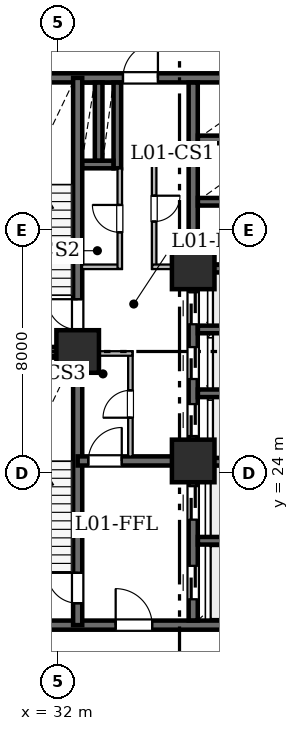
"""IFC4 building model, lengths in metres.
Left out: names, types, materials, properties, quantities, classifications, styles, units other than length and angle.
Written with IfcOpenShell. Run it as: python <this file> out.ifc"""

import sys

from ifc_helpers import new_model, si_unit, direction, frame, frame_2d, origin, origin_2d, place, context, subcontext, project, spatial, rectangle, hollow_rectangle, extrude, element, fill, save


model = new_model("IFC4")
c1 = context("Model", 3, precision=1e-05, world=origin(), true_north=direction((0.0, 1.0)))
c2 = subcontext(c1, "Body", "Model", "MODEL_VIEW")
j1 = project(units=[si_unit("LENGTHUNIT", "METRE"), si_unit("PLANEANGLEUNIT", "RADIAN")], contexts=[c1])
p1 = place(None, origin())
s1 = spatial("IfcSite", under=j1, at=p1, CompositionType="ELEMENT")
p2 = place(p1, origin())
s2 = spatial("IfcBuilding", under=s1, at=p2, CompositionType="ELEMENT")
p3 = place(p2, frame((0.0, 0.0, 7.2)))
s3 = spatial("IfcBuildingStorey", under=s2, at=p3, CompositionType="ELEMENT", Elevation=7.2)
for number, where, z_axis, x_axis in (
    (1, (32.65, 28.0, 0.0), (0.0, 0.0, 1.0), (1.0, 0.0, 0.0)),
    (2, (36.45, 24.4, 0.0), (0.0, 0.0, 1.0), (1.0, 0.0, 0.0)),
    (3, (36.45, 30.75, 0.0), (0.0, 0.0, 1.0), (1.0, 0.0, 0.0)),
):
    element("IfcColumn", number, at=place(p3, frame(where, z_axis=z_axis, x_axis=x_axis)), inside=s3, PredefinedType="COLUMN", context=c2, shape_type="SweptSolid", body=[
        extrude(hollow_rectangle(XDim=1.4, YDim=1.4, WallThickness=0.07, at=origin_2d()), origin(), (0.0, 0.0, 1.0), 4.8),
    ])
p4 = place(p3, frame((29.0, 19.0, 0.0), z_axis=(0.0, 0.0, 1.0), x_axis=(1.0, 0.0, 0.0)))
e4 = element("IfcWall", 4, at=p4, inside=s3, PredefinedType="SHEAR", context=c2, shape_type="SweptSolid", body=[
    extrude(rectangle(XDim=10.4, YDim=0.3, at=frame_2d((5.2, 0.0))), origin(), (0.0, 0.0, 1.0), 4.48),
])
p5 = place(p4, frame((4.9, 0.0, 0.0)))
e5 = element("IfcOpeningElement", 5, at=p5, cuts=e4, PredefinedType="OPENING", context=c2, shape_type="SweptSolid", body=[
    extrude(rectangle(XDim=1.2, YDim=2.15, at=frame_2d((0.6, 1.075))), frame((0.0, 0.16, 0.0), z_axis=(0.0, -1.0, 0.0), x_axis=(1.0, 0.0, 0.0)), (0.0, 0.0, 1.0), 0.32),
])
p6 = place(p3, frame((29.0, 37.0, 0.0), z_axis=(0.0, 0.0, 1.0), x_axis=(1.0, 0.0, 0.0)))
e6 = element("IfcWall", 6, at=p6, inside=s3, PredefinedType="SHEAR", context=c2, shape_type="SweptSolid", body=[
    extrude(rectangle(XDim=10.4, YDim=0.3, at=frame_2d((5.2, 0.0))), origin(), (0.0, 0.0, 1.0), 4.48),
])
p7 = place(p6, frame((5.14, 0.0, 0.0)))
e7 = element("IfcOpeningElement", 7, at=p7, cuts=e6, PredefinedType="OPENING", context=c2, shape_type="SweptSolid", body=[
    extrude(rectangle(XDim=1.15, YDim=2.2, at=frame_2d((0.575, 1.1))), frame((0.0, 0.16, 0.0), z_axis=(0.0, -1.0, 0.0), x_axis=(1.0, 0.0, 0.0)), (0.0, 0.0, 1.0), 0.32),
])
p8 = place(p3, frame((32.65, 19.0, 0.0), z_axis=(0.0, 0.0, 1.0), x_axis=(0.0, 1.0, 0.0)))
e8 = element("IfcWall", 8, at=p8, inside=s3, PredefinedType="SHEAR", context=c2, shape_type="SweptSolid", body=[
    extrude(rectangle(XDim=9.0, YDim=0.3, at=frame_2d((4.5, 0.0))), origin(), (0.0, 0.0, 1.0), 4.48),
])
p9 = place(p8, frame((0.72, 0.0, 0.0)))
e9 = element("IfcOpeningElement", 9, at=p9, cuts=e8, PredefinedType="OPENING", context=c2, shape_type="SweptSolid", body=[
    extrude(rectangle(XDim=1.0, YDim=2.15, at=frame_2d((0.5, 1.075))), frame((0.0, 0.16, 0.0), z_axis=(0.0, -1.0, 0.0), x_axis=(1.0, 0.0, 0.0)), (0.0, 0.0, 1.0), 0.32),
])
p10 = place(p3, frame((32.65, 28.0, 0.0), z_axis=(0.0, 0.0, 1.0), x_axis=(0.0, 1.0, 0.0)))
e10 = element("IfcWall", 10, at=p10, inside=s3, PredefinedType="SHEAR", context=c2, shape_type="SweptSolid", body=[
    extrude(rectangle(XDim=9.0, YDim=0.3, at=frame_2d((4.5, 0.0))), origin(), (0.0, 0.0, 1.0), 4.48),
])
p11 = place(p10, frame((0.72, 0.0, 0.0)))
e11 = element("IfcOpeningElement", 11, at=p11, cuts=e10, PredefinedType="OPENING", context=c2, shape_type="SweptSolid", body=[
    extrude(rectangle(XDim=1.0, YDim=2.15, at=frame_2d((0.5, 1.075))), frame((0.0, 0.16, 0.0), z_axis=(0.0, -1.0, 0.0), x_axis=(1.0, 0.0, 0.0)), (0.0, 0.0, 1.0), 0.32),
])
p12 = place(p3, frame((29.0, 28.0, 0.0), z_axis=(0.0, 0.0, 1.0), x_axis=(1.0, 0.0, 0.0)))
e12 = element("IfcWall", 12, at=p12, inside=s3, PredefinedType="SHEAR", context=c2, shape_type="SweptSolid", body=[
    extrude(rectangle(XDim=3.65, YDim=0.3, at=frame_2d((1.825, 0.0))), origin(), (0.0, 0.0, 1.0), 4.48),
])
p13 = place(p3, frame((32.65, 24.4, 0.0), z_axis=(0.0, 0.0, 1.0), x_axis=(1.0, 0.0, 0.0)))
e13 = element("IfcWall", 13, at=p13, inside=s3, PredefinedType="SHEAR", context=c2, shape_type="SweptSolid", body=[
    extrude(rectangle(XDim=3.8, YDim=0.3, at=frame_2d((1.9, 0.0))), origin(), (0.0, 0.0, 1.0), 4.48),
])
p14 = place(p13, frame((0.35, 0.0, 0.0)))
e14 = element("IfcOpeningElement", 14, at=p14, cuts=e13, PredefinedType="OPENING", context=c2, shape_type="SweptSolid", body=[
    extrude(rectangle(XDim=1.1, YDim=2.15, at=frame_2d((0.55, 1.075))), frame((0.0, 0.16, 0.0), z_axis=(0.0, -1.0, 0.0), x_axis=(1.0, 0.0, 0.0)), (0.0, 0.0, 1.0), 0.32),
])
p15 = place(p3, frame((36.45, 19.154, 0.0), z_axis=(0.0, 0.0, 1.0), x_axis=(0.0, 1.0, 0.0)))
e15 = element("IfcWall", 15, at=p15, inside=s3, PredefinedType="SHEAR", context=c2, shape_type="SweptSolid", body=[
    extrude(rectangle(XDim=4.546, YDim=0.3, at=frame_2d((2.273, 0.0))), origin(), (0.0, 0.0, 1.0), 4.48),
])
p16 = place(p15, frame((0.696, 0.0, 0.0)))
e16 = element("IfcOpeningElement", 16, at=p16, cuts=e15, PredefinedType="OPENING", context=c2, shape_type="SweptSolid", body=[
    extrude(rectangle(XDim=1.1, YDim=2.15, at=frame_2d((0.55, 1.075))), frame((0.0, 0.16, 0.0), z_axis=(0.0, -1.0, 0.0), x_axis=(1.0, 0.0, 0.0)), (0.0, 0.0, 1.0), 0.32),
])
p17 = place(p15, frame((3.316, 0.0, 0.0)))
e17 = element("IfcOpeningElement", 17, at=p17, cuts=e15, PredefinedType="OPENING", context=c2, shape_type="SweptSolid", body=[
    extrude(rectangle(XDim=1.1, YDim=2.15, at=frame_2d((0.55, 1.075))), frame((0.0, 0.16, 0.0), z_axis=(0.0, -1.0, 0.0), x_axis=(1.0, 0.0, 0.0)), (0.0, 0.0, 1.0), 0.32),
])
p18 = place(p3, frame((36.45, 25.1, 0.0), z_axis=(0.0, 0.0, 1.0), x_axis=(0.0, 1.0, 0.0)))
e18 = element("IfcWall", 18, at=p18, inside=s3, PredefinedType="SHEAR", context=c2, shape_type="SweptSolid", body=[
    extrude(rectangle(XDim=4.95, YDim=0.3, at=frame_2d((2.475, 0.0))), origin(), (0.0, 0.0, 1.0), 4.48),
])
p19 = place(p18, frame((0.12, 0.0, 0.0)))
e19 = element("IfcOpeningElement", 19, at=p19, cuts=e18, PredefinedType="OPENING", context=c2, shape_type="SweptSolid", body=[
    extrude(rectangle(XDim=1.05, YDim=2.15, at=frame_2d((0.525, 1.075))), frame((0.0, 0.16, 0.0), z_axis=(0.0, -1.0, 0.0), x_axis=(1.0, 0.0, 0.0)), (0.0, 0.0, 1.0), 0.32),
])
p20 = place(p18, frame((1.995, 0.0, 0.0)))
e20 = element("IfcOpeningElement", 20, at=p20, cuts=e18, PredefinedType="OPENING", context=c2, shape_type="SweptSolid", body=[
    extrude(rectangle(XDim=1.05, YDim=2.15, at=frame_2d((0.525, 1.075))), frame((0.0, 0.16, 0.0), z_axis=(0.0, -1.0, 0.0), x_axis=(1.0, 0.0, 0.0)), (0.0, 0.0, 1.0), 0.32),
])
p21 = place(p18, frame((3.795, 0.0, 0.0)))
e21 = element("IfcOpeningElement", 21, at=p21, cuts=e18, PredefinedType="OPENING", context=c2, shape_type="SweptSolid", body=[
    extrude(rectangle(XDim=1.05, YDim=2.15, at=frame_2d((0.525, 1.075))), frame((0.0, 0.16, 0.0), z_axis=(0.0, -1.0, 0.0), x_axis=(1.0, 0.0, 0.0)), (0.0, 0.0, 1.0), 0.32),
])
p22 = place(p3, frame((36.45, 31.45, 0.0), z_axis=(0.0, 0.0, 1.0), x_axis=(0.0, 1.0, 0.0)))
e22 = element("IfcWall", 22, at=p22, inside=s3, PredefinedType="SHEAR", context=c2, shape_type="SweptSolid", body=[
    extrude(rectangle(XDim=5.396, YDim=0.3, at=frame_2d((2.698, 0.0))), origin(), (0.0, 0.0, 1.0), 4.48),
])
for number, where, z_axis, x_axis in (
    (23, (36.604, 21.775, 0.0), (0.0, 0.0, 1.0), (1.0, 0.0, 0.0)),
    (24, (36.604, 24.375, 0.0), (0.0, 0.0, 1.0), (1.0, 0.0, 0.0)),
    (25, (36.604, 26.625, 0.0), (0.0, 0.0, 1.0), (1.0, 0.0, 0.0)),
    (26, (36.604, 28.725, 0.0), (0.0, 0.0, 1.0), (1.0, 0.0, 0.0)),
    (27, (36.604, 30.725, 0.0), (0.0, 0.0, 1.0), (1.0, 0.0, 0.0)),
    (28, (36.604, 32.925, 0.0), (0.0, 0.0, 1.0), (1.0, 0.0, 0.0)),
    (29, (36.604, 34.975, 0.0), (0.0, 0.0, 1.0), (1.0, 0.0, 0.0)),
):
    element("IfcWall", number, at=place(p3, frame(where, z_axis=z_axis, x_axis=x_axis)), inside=s3, PredefinedType="SHEAR", context=c2, shape_type="SweptSolid", body=[
        extrude(rectangle(XDim=2.642, YDim=0.25, at=frame_2d((1.321, 0.0))), origin(), (0.0, 0.0, 1.0), 4.48),
    ])
p23 = place(p3, frame((33.955, 34.025, 0.0), z_axis=(0.0, 0.0, 1.0), x_axis=(0.0, 1.0, 0.0)))
e30 = element("IfcWall", 30, at=p23, inside=s3, PredefinedType="SHEAR", context=c2, shape_type="SweptSolid", body=[
    extrude(rectangle(XDim=2.821, YDim=0.25, at=frame_2d((1.411, 0.0))), origin(), (0.0, 0.0, 1.0), 4.48),
])
p24 = place(p3, frame((32.804, 34.15, 0.0), z_axis=(0.0, 0.0, 1.0), x_axis=(1.0, 0.0, 0.0)))
e31 = element("IfcWall", 31, at=p24, inside=s3, PredefinedType="SHEAR", context=c2, shape_type="SweptSolid", body=[
    extrude(rectangle(XDim=1.022, YDim=0.25, at=frame_2d((0.511, 0.0))), origin(), (0.0, 0.0, 1.0), 4.48),
])
p25 = place(p3, frame((33.34, 34.279, 0.0), z_axis=(0.0, 0.0, 1.0), x_axis=(0.0, 1.0, 0.0)))
e32 = element("IfcWall", 32, at=p25, inside=s3, PredefinedType="SHEAR", context=c2, shape_type="SweptSolid", body=[
    extrude(rectangle(XDim=2.567, YDim=0.25, at=frame_2d((1.283, 0.0))), origin(), (0.0, 0.0, 1.0), 4.48),
])
p26 = place(p3, frame((36.306, 34.615, 0.0), z_axis=(0.0, 0.0, 1.0), x_axis=(-1.0, 0.0, 0.0)))
e33 = element("IfcWall", 33, at=p26, inside=s3, PredefinedType="STANDARD", context=c2, shape_type="SweptSolid", body=[
    extrude(rectangle(XDim=1.206, YDim=0.15, at=frame_2d((0.603, 0.0))), origin(), (0.0, 0.0, 1.0), 4.48),
])
p27 = place(p3, frame((35.165, 34.678, 0.0), z_axis=(0.0, 0.0, 1.0), x_axis=(0.0, -1.0, 0.0)))
e34 = element("IfcWall", 34, at=p27, inside=s3, PredefinedType="STANDARD", context=c2, shape_type="SweptSolid", body=[
    extrude(rectangle(XDim=3.958, YDim=0.15, at=frame_2d((1.979, 0.0))), origin(), (0.0, 0.0, 1.0), 4.48),
])
p28 = place(p27, frame((1.554, 0.0, 0.0)))
e35 = element("IfcOpeningElement", 35, at=p28, cuts=e34, PredefinedType="OPENING", context=c2, shape_type="SweptSolid", body=[
    extrude(rectangle(XDim=0.85, YDim=2.1, at=frame_2d((0.425, 1.05))), frame((0.0, 0.085, 0.0), z_axis=(0.0, -1.0, 0.0), x_axis=(1.0, 0.0, 0.0)), (0.0, 0.0, 1.0), 0.17),
])
p29 = place(p3, frame((35.102, 30.785, 0.0), z_axis=(0.0, 0.0, 1.0), x_axis=(1.0, 0.0, 0.0)))
e36 = element("IfcWall", 36, at=p29, inside=s3, PredefinedType="STANDARD", context=c2, shape_type="SweptSolid", body=[
    extrude(rectangle(XDim=1.198, YDim=0.15, at=frame_2d((0.599, 0.0))), origin(), (0.0, 0.0, 1.0), 4.48),
])
p30 = place(p3, frame((32.794, 30.785, 0.0), z_axis=(0.0, 0.0, 1.0), x_axis=(1.0, 0.0, 0.0)))
e37 = element("IfcWall", 37, at=p30, inside=s3, PredefinedType="STANDARD", context=c2, shape_type="SweptSolid", body=[
    extrude(rectangle(XDim=1.306, YDim=0.15, at=frame_2d((0.653, 0.0))), origin(), (0.0, 0.0, 1.0), 3.937),
])
p31 = place(p3, frame((34.035, 30.72, 0.0), z_axis=(0.0, 0.0, 1.0), x_axis=(0.0, 1.0, 0.0)))
e38 = element("IfcWall", 38, at=p31, inside=s3, PredefinedType="STANDARD", context=c2, shape_type="SweptSolid", body=[
    extrude(rectangle(XDim=3.3, YDim=0.15, at=frame_2d((1.65, 0.0))), origin(), (0.0, 0.0, 1.0), 4.48),
])
p32 = place(p31, frame((1.2, 0.0, 0.0)))
e39 = element("IfcOpeningElement", 39, at=p32, cuts=e38, PredefinedType="OPENING", context=c2, shape_type="SweptSolid", body=[
    extrude(rectangle(XDim=0.9, YDim=2.1, at=frame_2d((0.45, 1.05))), frame((0.0, 0.085, 0.0), z_axis=(0.0, -1.0, 0.0), x_axis=(1.0, 0.0, 0.0)), (0.0, 0.0, 1.0), 0.17),
])
p33 = place(p3, frame((34.385, 24.544, 0.0), z_axis=(0.0, 0.0, 1.0), x_axis=(0.0, 1.0, 0.0)))
e40 = element("IfcWall", 40, at=p33, inside=s3, PredefinedType="STANDARD", context=c2, shape_type="SweptSolid", body=[
    extrude(rectangle(XDim=3.456, YDim=0.15, at=frame_2d((1.728, 0.0))), origin(), (0.0, 0.0, 1.0), 4.48),
])
p34 = place(p33, frame((1.278, 0.0, 0.0)))
e41 = element("IfcOpeningElement", 41, at=p34, cuts=e40, PredefinedType="OPENING", context=c2, shape_type="SweptSolid", body=[
    extrude(rectangle(XDim=0.9, YDim=2.1, at=frame_2d((0.45, 1.05))), frame((0.0, 0.085, 0.0), z_axis=(0.0, -1.0, 0.0), x_axis=(1.0, 0.0, 0.0)), (0.0, 0.0, 1.0), 0.17),
])
p35 = place(p3, frame((34.45, 27.935, 0.0), z_axis=(0.0, 0.0, 1.0), x_axis=(-1.0, 0.0, 0.0)))
e42 = element("IfcWall", 42, at=p35, inside=s3, PredefinedType="STANDARD", context=c2, shape_type="SweptSolid", body=[
    extrude(rectangle(XDim=1.656, YDim=0.15, at=frame_2d((0.828, 0.0))), origin(), (0.0, 0.0, 1.0), 3.937),
])
p36 = place(p9, origin())
e43 = element("IfcDoor", 43, at=p36, inside=s3, OperationType="SINGLE_SWING_RIGHT", PredefinedType="DOOR", context=c2, shape_type="SweptSolid", body=[
    extrude(rectangle(XDim=1.0, YDim=2.15, at=frame_2d((0.5, 1.075))), frame((0.0, 0.025, 0.0), z_axis=(0.0, -1.0, 0.0), x_axis=(1.0, 0.0, 0.0)), (0.0, 0.0, 1.0), 0.05),
])
fill(e9, e43)
p37 = place(p11, origin())
e44 = element("IfcDoor", 44, at=p37, inside=s3, OperationType="SINGLE_SWING_RIGHT", PredefinedType="DOOR", context=c2, shape_type="SweptSolid", body=[
    extrude(rectangle(XDim=1.0, YDim=2.15, at=frame_2d((0.5, 1.075))), frame((0.0, 0.025, 0.0), z_axis=(0.0, -1.0, 0.0), x_axis=(1.0, 0.0, 0.0)), (0.0, 0.0, 1.0), 0.05),
])
fill(e11, e44)
p38 = place(p14, origin())
e45 = element("IfcDoor", 45, at=p38, inside=s3, OperationType="SINGLE_SWING_RIGHT", PredefinedType="DOOR", context=c2, shape_type="SweptSolid", body=[
    extrude(rectangle(XDim=1.1, YDim=2.15, at=frame_2d((0.55, 1.075))), frame((0.0, 0.025, 0.0), z_axis=(0.0, -1.0, 0.0), x_axis=(1.0, 0.0, 0.0)), (0.0, 0.0, 1.0), 0.05),
])
fill(e14, e45)
p39 = place(p5, origin())
e46 = element("IfcDoor", 46, at=p39, inside=s3, OperationType="SINGLE_SWING_LEFT", PredefinedType="DOOR", context=c2, shape_type="SweptSolid", body=[
    extrude(rectangle(XDim=1.2, YDim=2.15, at=frame_2d((0.6, 1.075))), frame((0.0, 0.025, 0.0), z_axis=(0.0, -1.0, 0.0), x_axis=(1.0, 0.0, 0.0)), (0.0, 0.0, 1.0), 0.05),
])
fill(e5, e46)
p40 = place(p7, origin())
e47 = element("IfcDoor", 47, at=p40, inside=s3, OperationType="SINGLE_SWING_RIGHT", PredefinedType="DOOR", context=c2, shape_type="SweptSolid", body=[
    extrude(rectangle(XDim=1.15, YDim=2.2, at=frame_2d((0.575, 1.1))), frame((0.0, 0.025, 0.0), z_axis=(0.0, -1.0, 0.0), x_axis=(1.0, 0.0, 0.0)), (0.0, 0.0, 1.0), 0.05),
])
fill(e7, e47)
p41 = place(p16, origin())
e48 = element("IfcDoor", 48, at=p41, inside=s3, OperationType="SLIDING_TO_LEFT", PredefinedType="DOOR", context=c2, shape_type="SweptSolid", body=[
    extrude(rectangle(XDim=1.1, YDim=2.15, at=frame_2d((0.55, 1.075))), frame((0.0, 0.025, 0.0), z_axis=(0.0, -1.0, 0.0), x_axis=(1.0, 0.0, 0.0)), (0.0, 0.0, 1.0), 0.05),
])
fill(e16, e48)
p42 = place(p17, origin())
e49 = element("IfcDoor", 49, at=p42, inside=s3, OperationType="SLIDING_TO_LEFT", PredefinedType="DOOR", context=c2, shape_type="SweptSolid", body=[
    extrude(rectangle(XDim=1.1, YDim=2.15, at=frame_2d((0.55, 1.075))), frame((0.0, 0.025, 0.0), z_axis=(0.0, -1.0, 0.0), x_axis=(1.0, 0.0, 0.0)), (0.0, 0.0, 1.0), 0.05),
])
fill(e17, e49)
p43 = place(p19, origin())
e50 = element("IfcDoor", 50, at=p43, inside=s3, OperationType="SLIDING_TO_LEFT", PredefinedType="DOOR", context=c2, shape_type="SweptSolid", body=[
    extrude(rectangle(XDim=1.05, YDim=2.15, at=frame_2d((0.525, 1.075))), frame((0.0, 0.025, 0.0), z_axis=(0.0, -1.0, 0.0), x_axis=(1.0, 0.0, 0.0)), (0.0, 0.0, 1.0), 0.05),
])
fill(e19, e50)
p44 = place(p20, origin())
e51 = element("IfcDoor", 51, at=p44, inside=s3, OperationType="SLIDING_TO_LEFT", PredefinedType="DOOR", context=c2, shape_type="SweptSolid", body=[
    extrude(rectangle(XDim=1.05, YDim=2.15, at=frame_2d((0.525, 1.075))), frame((0.0, 0.025, 0.0), z_axis=(0.0, -1.0, 0.0), x_axis=(1.0, 0.0, 0.0)), (0.0, 0.0, 1.0), 0.05),
])
fill(e20, e51)
p45 = place(p21, origin())
e52 = element("IfcDoor", 52, at=p45, inside=s3, OperationType="SLIDING_TO_LEFT", PredefinedType="DOOR", context=c2, shape_type="SweptSolid", body=[
    extrude(rectangle(XDim=1.05, YDim=2.15, at=frame_2d((0.525, 1.075))), frame((0.0, 0.025, 0.0), z_axis=(0.0, -1.0, 0.0), x_axis=(1.0, 0.0, 0.0)), (0.0, 0.0, 1.0), 0.05),
])
fill(e21, e52)
p46 = place(p28, origin())
e53 = element("IfcDoor", 53, at=p46, inside=s3, OperationType="SINGLE_SWING_LEFT", PredefinedType="DOOR", context=c2, shape_type="SweptSolid", body=[
    extrude(rectangle(XDim=0.85, YDim=2.1, at=frame_2d((0.425, 1.05))), frame((0.0, 0.025, 0.0), z_axis=(0.0, -1.0, 0.0), x_axis=(1.0, 0.0, 0.0)), (0.0, 0.0, 1.0), 0.05),
])
fill(e35, e53)
p47 = place(p32, origin())
e54 = element("IfcDoor", 54, at=p47, inside=s3, OperationType="SINGLE_SWING_RIGHT", PredefinedType="DOOR", context=c2, shape_type="SweptSolid", body=[
    extrude(rectangle(XDim=0.9, YDim=2.1, at=frame_2d((0.45, 1.05))), frame((0.0, 0.025, 0.0), z_axis=(0.0, -1.0, 0.0), x_axis=(1.0, 0.0, 0.0)), (0.0, 0.0, 1.0), 0.05),
])
fill(e39, e54)
p48 = place(p34, origin())
e55 = element("IfcDoor", 55, at=p48, inside=s3, OperationType="SINGLE_SWING_LEFT", PredefinedType="DOOR", context=c2, shape_type="SweptSolid", body=[
    extrude(rectangle(XDim=0.9, YDim=2.1, at=frame_2d((0.45, 1.05))), frame((0.0, 0.025, 0.0), z_axis=(0.0, -1.0, 0.0), x_axis=(1.0, 0.0, 0.0)), (0.0, 0.0, 1.0), 0.05),
])
fill(e41, e55)
save(model, sys.argv[1])
